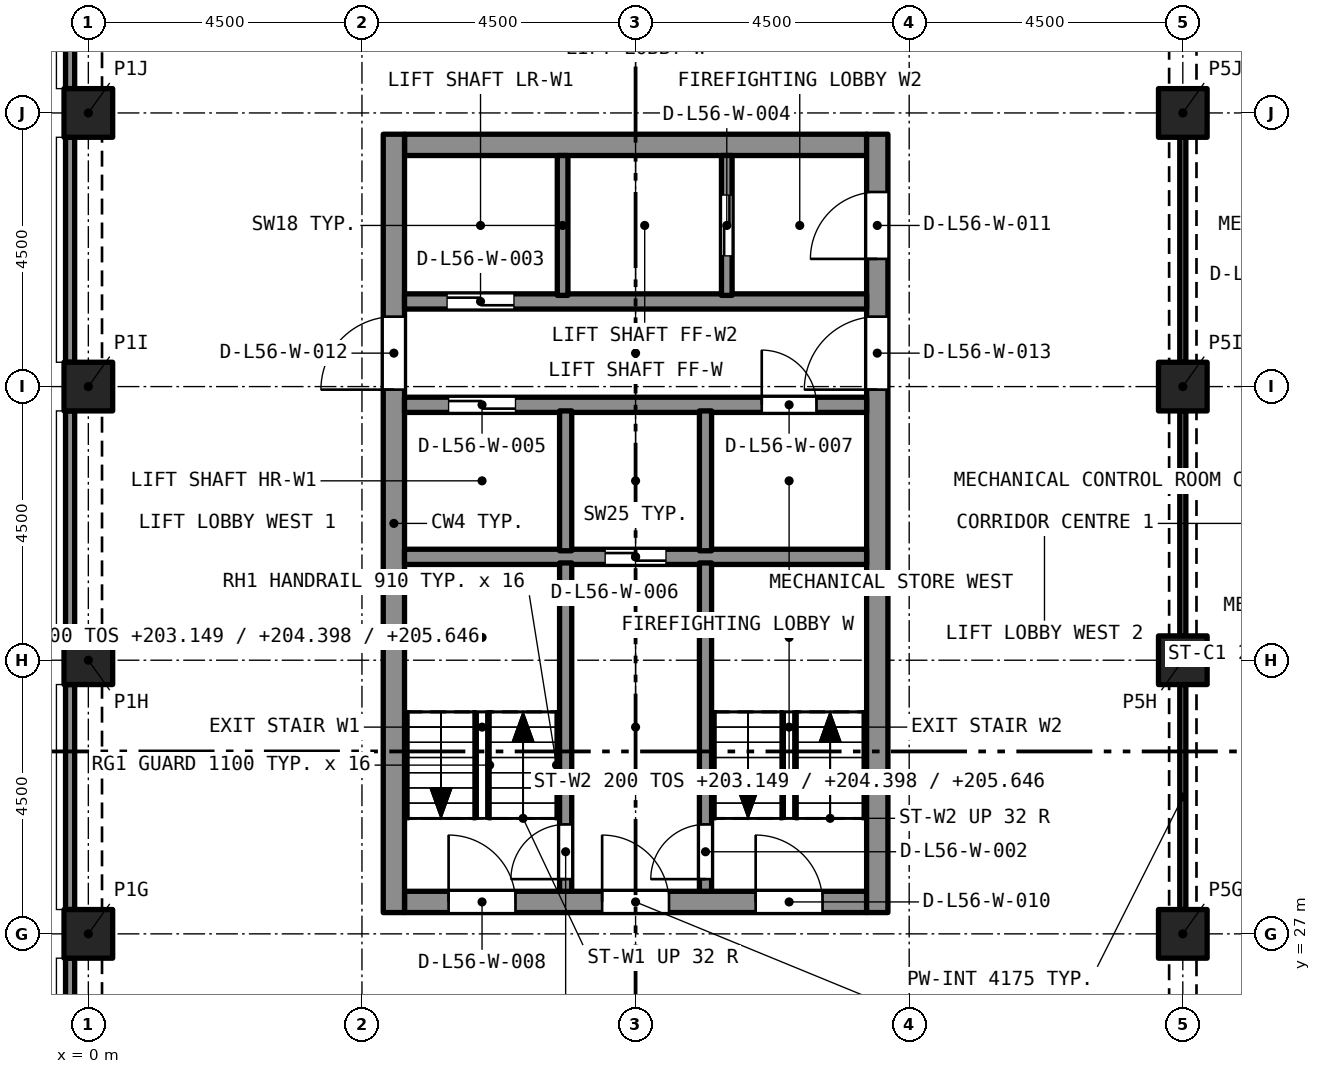
"""IFC4 building model, lengths in metres.
Left out: names, types, materials, properties, quantities, classifications, styles, units other than length and angle.
Written with IfcOpenShell. Run it as: python <this file> out.ifc"""

import sys

from ifc_helpers import new_model, si_unit, direction, frame, frame_2d, origin, origin_2d, place, context, subcontext, project, spatial, rectangle, extrude, element, fill, save


model = new_model("IFC4")
c1 = context("Model", 3, precision=1e-05, world=origin(), true_north=direction((0.0, 1.0)))
c2 = subcontext(c1, "Body", "Model", "MODEL_VIEW")
j1 = project(units=[si_unit("LENGTHUNIT", "METRE"), si_unit("PLANEANGLEUNIT", "RADIAN")], contexts=[c1])
p1 = place(None, origin())
s1 = spatial("IfcSite", under=j1, at=p1, CompositionType="ELEMENT")
p2 = place(p1, origin())
s2 = spatial("IfcBuilding", under=s1, at=p2, CompositionType="ELEMENT")
p3 = place(p2, frame((0.0, 0.0, 201.9)))
s3 = spatial("IfcBuildingStorey", under=s2, at=p3, CompositionType="ELEMENT", Elevation=201.9)
for number, where, z_axis, x_axis in (
    (1, (0.0, 27.0, 0.0), (0.0, 0.0, 1.0), (1.0, 0.0, 0.0)),
    (2, (18.0, 27.0, 0.0), (0.0, 0.0, 1.0), (1.0, 0.0, 0.0)),
    (3, (0.0, 31.5, 0.0), (0.0, 0.0, 1.0), (1.0, 0.0, 0.0)),
    (4, (18.0, 31.5, 0.0), (0.0, 0.0, 1.0), (1.0, 0.0, 0.0)),
    (5, (0.0, 36.0, 0.0), (0.0, 0.0, 1.0), (1.0, 0.0, 0.0)),
    (6, (18.0, 36.0, 0.0), (0.0, 0.0, 1.0), (1.0, 0.0, 0.0)),
    (7, (0.0, 40.5, 0.0), (0.0, 0.0, 1.0), (1.0, 0.0, 0.0)),
    (8, (18.0, 40.5, 0.0), (0.0, 0.0, 1.0), (1.0, 0.0, 0.0)),
):
    element("IfcColumn", number, at=place(p3, frame(where, z_axis=z_axis, x_axis=x_axis)), inside=s3, PredefinedType="COLUMN", context=c2, shape_type="SweptSolid", body=[
        extrude(rectangle(XDim=0.8, YDim=0.8, at=origin_2d()), origin(), (0.0, 0.0, 1.0), 4.995),
    ])
p4 = place(p3, frame((5.2, 27.525, 0.0), z_axis=(0.0, 0.0, 1.0), x_axis=(1.0, 0.0, 0.0)))
e9 = element("IfcWall", 9, at=p4, inside=s3, PredefinedType="SOLIDWALL", context=c2, shape_type="SweptSolid", body=[
    extrude(rectangle(XDim=7.6, YDim=0.35, at=frame_2d((3.8, 0.0))), origin(), (0.0, 0.0, 1.0), 4.995),
])
p5 = place(p4, frame((0.725, 0.0, 0.0)))
e10 = element("IfcOpeningElement", 10, at=p5, cuts=e9, PredefinedType="OPENING", context=c2, shape_type="SweptSolid", body=[
    extrude(rectangle(XDim=1.1, YDim=2.1, at=frame_2d((0.55, 1.05))), frame((0.0, 0.185, 0.0), z_axis=(0.0, -1.0, 0.0), x_axis=(1.0, 0.0, 0.0)), (0.0, 0.0, 1.0), 0.37),
])
p6 = place(p4, frame((3.25, 0.0, 0.0)))
e11 = element("IfcOpeningElement", 11, at=p6, cuts=e9, PredefinedType="OPENING", context=c2, shape_type="SweptSolid", body=[
    extrude(rectangle(XDim=1.1, YDim=2.1, at=frame_2d((0.55, 1.05))), frame((0.0, 0.185, 0.0), z_axis=(0.0, -1.0, 0.0), x_axis=(1.0, 0.0, 0.0)), (0.0, 0.0, 1.0), 0.37),
])
p7 = place(p4, frame((5.775, 0.0, 0.0)))
e12 = element("IfcOpeningElement", 12, at=p7, cuts=e9, PredefinedType="OPENING", context=c2, shape_type="SweptSolid", body=[
    extrude(rectangle(XDim=1.1, YDim=2.1, at=frame_2d((0.55, 1.05))), frame((0.0, 0.185, 0.0), z_axis=(0.0, -1.0, 0.0), x_axis=(1.0, 0.0, 0.0)), (0.0, 0.0, 1.0), 0.37),
])
p8 = place(p3, frame((5.2, 39.975, 0.0), z_axis=(0.0, 0.0, 1.0), x_axis=(1.0, 0.0, 0.0)))
e13 = element("IfcWall", 13, at=p8, inside=s3, PredefinedType="SOLIDWALL", context=c2, shape_type="SweptSolid", body=[
    extrude(rectangle(XDim=7.6, YDim=0.35, at=frame_2d((3.8, 0.0))), origin(), (0.0, 0.0, 1.0), 4.995),
])
p9 = place(p3, frame((5.025, 27.35, 0.0), z_axis=(0.0, 0.0, 1.0), x_axis=(0.0, 1.0, 0.0)))
e14 = element("IfcWall", 14, at=p9, inside=s3, PredefinedType="SOLIDWALL", context=c2, shape_type="SweptSolid", body=[
    extrude(rectangle(XDim=12.8, YDim=0.35, at=frame_2d((6.4, 0.0))), origin(), (0.0, 0.0, 1.0), 4.995),
])
p10 = place(p9, frame((8.6, 0.0, 0.0)))
e15 = element("IfcOpeningElement", 15, at=p10, cuts=e14, PredefinedType="OPENING", context=c2, shape_type="SweptSolid", body=[
    extrude(rectangle(XDim=1.2, YDim=2.1, at=frame_2d((0.6, 1.05))), frame((0.0, 0.185, 0.0), z_axis=(0.0, -1.0, 0.0), x_axis=(1.0, 0.0, 0.0)), (0.0, 0.0, 1.0), 0.37),
])
p11 = place(p3, frame((12.975, 27.35, 0.0), z_axis=(0.0, 0.0, 1.0), x_axis=(0.0, 1.0, 0.0)))
e16 = element("IfcWall", 16, at=p11, inside=s3, PredefinedType="SOLIDWALL", context=c2, shape_type="SweptSolid", body=[
    extrude(rectangle(XDim=12.8, YDim=0.35, at=frame_2d((6.4, 0.0))), origin(), (0.0, 0.0, 1.0), 4.995),
])
p12 = place(p11, frame((10.75, 0.0, 0.0)))
e17 = element("IfcOpeningElement", 17, at=p12, cuts=e16, PredefinedType="OPENING", context=c2, shape_type="SweptSolid", body=[
    extrude(rectangle(XDim=1.1, YDim=2.1, at=frame_2d((0.55, 1.05))), frame((0.0, 0.185, 0.0), z_axis=(0.0, -1.0, 0.0), x_axis=(1.0, 0.0, 0.0)), (0.0, 0.0, 1.0), 0.37),
])
p13 = place(p11, frame((8.6, 0.0, 0.0)))
e18 = element("IfcOpeningElement", 18, at=p13, cuts=e16, PredefinedType="OPENING", context=c2, shape_type="SweptSolid", body=[
    extrude(rectangle(XDim=1.2, YDim=2.1, at=frame_2d((0.6, 1.05))), frame((0.0, 0.185, 0.0), z_axis=(0.0, -1.0, 0.0), x_axis=(1.0, 0.0, 0.0)), (0.0, 0.0, 1.0), 0.37),
])
for number, where, z_axis, x_axis in (
    (19, (-0.3, 40.9, 0.0), (0.0, 0.0, 1.0), (0.0, 1.0, 0.0)),
    (20, (-0.3, 36.4, 0.0), (0.0, 0.0, 1.0), (0.0, 1.0, 0.0)),
    (21, (-0.3, 31.9, 0.0), (0.0, 0.0, 1.0), (0.0, 1.0, 0.0)),
    (22, (-0.3, 27.4, 0.0), (0.0, 0.0, 1.0), (0.0, 1.0, 0.0)),
    (23, (-0.3, 22.9, 0.0), (0.0, 0.0, 1.0), (0.0, 1.0, 0.0)),
):
    element("IfcWall", number, at=place(p3, frame(where, z_axis=z_axis, x_axis=x_axis)), inside=s3, PredefinedType="SOLIDWALL", context=c2, shape_type="SweptSolid", body=[
        extrude(rectangle(XDim=3.7, YDim=0.15, at=frame_2d((1.85, 0.0))), origin(), (0.0, 0.0, 1.0), 4.995),
    ])
p14 = place(p3, frame((5.2, 33.2, 0.0), z_axis=(0.0, 0.0, 1.0), x_axis=(1.0, 0.0, 0.0)))
e24 = element("IfcWall", 24, at=p14, inside=s3, PredefinedType="SOLIDWALL", context=c2, shape_type="SweptSolid", body=[
    extrude(rectangle(XDim=7.6, YDim=0.25, at=frame_2d((3.8, 0.0))), origin(), (0.0, 0.0, 1.0), 4.695),
])
p15 = place(p14, frame((3.3, 0.0, 0.0)))
e25 = element("IfcOpeningElement", 25, at=p15, cuts=e24, PredefinedType="OPENING", context=c2, shape_type="SweptSolid", body=[
    extrude(rectangle(XDim=1.0, YDim=2.1, at=frame_2d((0.5, 1.05))), frame((0.0, 0.135, 0.0), z_axis=(0.0, -1.0, 0.0), x_axis=(1.0, 0.0, 0.0)), (0.0, 0.0, 1.0), 0.27),
])
p16 = place(p3, frame((5.2, 35.7, 0.0), z_axis=(0.0, 0.0, 1.0), x_axis=(1.0, 0.0, 0.0)))
e26 = element("IfcWall", 26, at=p16, inside=s3, PredefinedType="SOLIDWALL", context=c2, shape_type="SweptSolid", body=[
    extrude(rectangle(XDim=7.6, YDim=0.25, at=frame_2d((3.8, 0.0))), origin(), (0.0, 0.0, 1.0), 4.695),
])
p17 = place(p16, frame((0.725, 0.0, 0.0)))
e27 = element("IfcOpeningElement", 27, at=p17, cuts=e26, PredefinedType="OPENING", context=c2, shape_type="SweptSolid", body=[
    extrude(rectangle(XDim=1.1, YDim=2.4, at=frame_2d((0.55, 1.2))), frame((0.0, 0.135, 0.0), z_axis=(0.0, -1.0, 0.0), x_axis=(1.0, 0.0, 0.0)), (0.0, 0.0, 1.0), 0.27),
])
p18 = place(p16, frame((5.875, 0.0, 0.0)))
e28 = element("IfcOpeningElement", 28, at=p18, cuts=e26, PredefinedType="OPENING", context=c2, shape_type="SweptSolid", body=[
    extrude(rectangle(XDim=0.9, YDim=2.1, at=frame_2d((0.45, 1.05))), frame((0.0, 0.135, 0.0), z_axis=(0.0, -1.0, 0.0), x_axis=(1.0, 0.0, 0.0)), (0.0, 0.0, 1.0), 0.27),
])
p19 = place(p3, frame((5.2, 37.4, 0.0), z_axis=(0.0, 0.0, 1.0), x_axis=(1.0, 0.0, 0.0)))
e29 = element("IfcWall", 29, at=p19, inside=s3, PredefinedType="SOLIDWALL", context=c2, shape_type="SweptSolid", body=[
    extrude(rectangle(XDim=7.6, YDim=0.25, at=frame_2d((3.8, 0.0))), origin(), (0.0, 0.0, 1.0), 4.695),
])
p20 = place(p19, frame((0.7, 0.0, 0.0)))
e30 = element("IfcOpeningElement", 30, at=p20, cuts=e29, PredefinedType="OPENING", context=c2, shape_type="SweptSolid", body=[
    extrude(rectangle(XDim=1.1, YDim=2.4, at=frame_2d((0.55, 1.2))), frame((0.0, 0.135, 0.0), z_axis=(0.0, -1.0, 0.0), x_axis=(1.0, 0.0, 0.0)), (0.0, 0.0, 1.0), 0.27),
])
p21 = place(p3, frame((7.85, 27.7, 0.0), z_axis=(0.0, 0.0, 1.0), x_axis=(0.0, 1.0, 0.0)))
e31 = element("IfcWall", 31, at=p21, inside=s3, PredefinedType="SOLIDWALL", context=c2, shape_type="SweptSolid", body=[
    extrude(rectangle(XDim=5.4, YDim=0.2, at=frame_2d((2.7, 0.0))), origin(), (0.0, 0.0, 1.0), 4.695),
])
p22 = place(p21, frame((0.2, 0.0, 0.0)))
e32 = element("IfcOpeningElement", 32, at=p22, cuts=e31, PredefinedType="OPENING", context=c2, shape_type="SweptSolid", body=[
    extrude(rectangle(XDim=0.9, YDim=2.1, at=frame_2d((0.45, 1.05))), frame((0.0, 0.11, 0.0), z_axis=(0.0, -1.0, 0.0), x_axis=(1.0, 0.0, 0.0)), (0.0, 0.0, 1.0), 0.22),
])
p23 = place(p3, frame((10.15, 27.7, 0.0), z_axis=(0.0, 0.0, 1.0), x_axis=(0.0, 1.0, 0.0)))
e33 = element("IfcWall", 33, at=p23, inside=s3, PredefinedType="SOLIDWALL", context=c2, shape_type="SweptSolid", body=[
    extrude(rectangle(XDim=5.4, YDim=0.2, at=frame_2d((2.7, 0.0))), origin(), (0.0, 0.0, 1.0), 4.695),
])
p24 = place(p23, frame((0.2, 0.0, 0.0)))
e34 = element("IfcOpeningElement", 34, at=p24, cuts=e33, PredefinedType="OPENING", context=c2, shape_type="SweptSolid", body=[
    extrude(rectangle(XDim=0.9, YDim=2.1, at=frame_2d((0.45, 1.05))), frame((0.0, 0.11, 0.0), z_axis=(0.0, -1.0, 0.0), x_axis=(1.0, 0.0, 0.0)), (0.0, 0.0, 1.0), 0.22),
])
for number, where, z_axis, x_axis in (
    (35, (7.85, 33.3, 0.0), (0.0, 0.0, 1.0), (0.0, 1.0, 0.0)),
    (36, (10.15, 33.3, 0.0), (0.0, 0.0, 1.0), (0.0, 1.0, 0.0)),
):
    element("IfcWall", number, at=place(p3, frame(where, z_axis=z_axis, x_axis=x_axis)), inside=s3, PredefinedType="SOLIDWALL", context=c2, shape_type="SweptSolid", body=[
        extrude(rectangle(XDim=2.3, YDim=0.2, at=frame_2d((1.15, 0.0))), origin(), (0.0, 0.0, 1.0), 4.695),
    ])
p25 = place(p3, frame((7.8, 37.5, 0.0), z_axis=(0.0, 0.0, 1.0), x_axis=(0.0, 1.0, 0.0)))
e37 = element("IfcWall", 37, at=p25, inside=s3, PredefinedType="SOLIDWALL", context=c2, shape_type="SweptSolid", body=[
    extrude(rectangle(XDim=2.3, YDim=0.175, at=frame_2d((1.15, 0.0))), origin(), (0.0, 0.0, 1.0), 4.695),
])
p26 = place(p3, frame((10.5, 37.5, 0.0), z_axis=(0.0, 0.0, 1.0), x_axis=(0.0, 1.0, 0.0)))
e38 = element("IfcWall", 38, at=p26, inside=s3, PredefinedType="SOLIDWALL", context=c2, shape_type="SweptSolid", body=[
    extrude(rectangle(XDim=2.3, YDim=0.175, at=frame_2d((1.15, 0.0))), origin(), (0.0, 0.0, 1.0), 4.695),
])
p27 = place(p26, frame((0.65, 0.0, 0.0)))
e39 = element("IfcOpeningElement", 39, at=p27, cuts=e38, PredefinedType="OPENING", context=c2, shape_type="SweptSolid", body=[
    extrude(rectangle(XDim=1.0, YDim=2.1, at=frame_2d((0.5, 1.05))), frame((0.0, 0.097, 0.0), z_axis=(0.0, -1.0, 0.0), x_axis=(1.0, 0.0, 0.0)), (0.0, 0.0, 1.0), 0.195),
])
for number, where, z_axis, x_axis in (
    (40, (18.0, 27.4, 0.0), (0.0, 0.0, 1.0), (0.0, 1.0, 0.0)),
    (41, (18.0, 31.9, 0.0), (0.0, 0.0, 1.0), (0.0, 1.0, 0.0)),
    (42, (18.0, 36.4, 0.0), (0.0, 0.0, 1.0), (0.0, 1.0, 0.0)),
):
    element("IfcWall", number, at=place(p3, frame(where, z_axis=z_axis, x_axis=x_axis)), inside=s3, PredefinedType="PARTITIONING", context=c2, shape_type="SweptSolid", body=[
        extrude(rectangle(XDim=3.7, YDim=0.1, at=frame_2d((1.85, 0.0))), origin(), (0.0, 0.0, 1.0), 4.175),
    ])
p28 = place(p22, origin())
e43 = element("IfcDoor", 43, at=p28, inside=s3, OperationType="SINGLE_SWING_LEFT", PredefinedType="DOOR", context=c2, shape_type="SweptSolid", body=[
    extrude(rectangle(XDim=0.9, YDim=2.1, at=frame_2d((0.45, 1.05))), frame((0.0, 0.025, 0.0), z_axis=(0.0, -1.0, 0.0), x_axis=(1.0, 0.0, 0.0)), (0.0, 0.0, 1.0), 0.05),
])
fill(e32, e43)
p29 = place(p24, origin())
e44 = element("IfcDoor", 44, at=p29, inside=s3, OperationType="SINGLE_SWING_LEFT", PredefinedType="DOOR", context=c2, shape_type="SweptSolid", body=[
    extrude(rectangle(XDim=0.9, YDim=2.1, at=frame_2d((0.45, 1.05))), frame((0.0, 0.025, 0.0), z_axis=(0.0, -1.0, 0.0), x_axis=(1.0, 0.0, 0.0)), (0.0, 0.0, 1.0), 0.05),
])
fill(e34, e44)
p30 = place(p20, origin())
e45 = element("IfcDoor", 45, at=p30, inside=s3, OperationType="SLIDING_TO_LEFT", PredefinedType="DOOR", context=c2, shape_type="SweptSolid", body=[
    extrude(rectangle(XDim=1.1, YDim=2.4, at=frame_2d((0.55, 1.2))), frame((0.0, 0.025, 0.0), z_axis=(0.0, -1.0, 0.0), x_axis=(1.0, 0.0, 0.0)), (0.0, 0.0, 1.0), 0.05),
])
fill(e30, e45)
p31 = place(p27, origin())
e46 = element("IfcDoor", 46, at=p31, inside=s3, OperationType="SLIDING_TO_LEFT", PredefinedType="DOOR", context=c2, shape_type="SweptSolid", body=[
    extrude(rectangle(XDim=1.0, YDim=2.1, at=frame_2d((0.5, 1.05))), frame((0.0, 0.025, 0.0), z_axis=(0.0, -1.0, 0.0), x_axis=(1.0, 0.0, 0.0)), (0.0, 0.0, 1.0), 0.05),
])
fill(e39, e46)
p32 = place(p17, origin())
e47 = element("IfcDoor", 47, at=p32, inside=s3, OperationType="SLIDING_TO_LEFT", PredefinedType="DOOR", context=c2, shape_type="SweptSolid", body=[
    extrude(rectangle(XDim=1.1, YDim=2.4, at=frame_2d((0.55, 1.2))), frame((0.0, 0.025, 0.0), z_axis=(0.0, -1.0, 0.0), x_axis=(1.0, 0.0, 0.0)), (0.0, 0.0, 1.0), 0.05),
])
fill(e27, e47)
p33 = place(p15, origin())
e48 = element("IfcDoor", 48, at=p33, inside=s3, OperationType="SLIDING_TO_LEFT", PredefinedType="DOOR", context=c2, shape_type="SweptSolid", body=[
    extrude(rectangle(XDim=1.0, YDim=2.1, at=frame_2d((0.5, 1.05))), frame((0.0, 0.025, 0.0), z_axis=(0.0, -1.0, 0.0), x_axis=(1.0, 0.0, 0.0)), (0.0, 0.0, 1.0), 0.05),
])
fill(e25, e48)
p34 = place(p18, origin())
e49 = element("IfcDoor", 49, at=p34, inside=s3, OperationType="SINGLE_SWING_LEFT", PredefinedType="DOOR", context=c2, shape_type="SweptSolid", body=[
    extrude(rectangle(XDim=0.9, YDim=2.1, at=frame_2d((0.45, 1.05))), frame((0.0, 0.025, 0.0), z_axis=(0.0, -1.0, 0.0), x_axis=(1.0, 0.0, 0.0)), (0.0, 0.0, 1.0), 0.05),
])
fill(e28, e49)
p35 = place(p5, origin())
e50 = element("IfcDoor", 50, at=p35, inside=s3, OperationType="SINGLE_SWING_LEFT", PredefinedType="DOOR", context=c2, shape_type="SweptSolid", body=[
    extrude(rectangle(XDim=1.1, YDim=2.1, at=frame_2d((0.55, 1.05))), frame((0.0, 0.025, 0.0), z_axis=(0.0, -1.0, 0.0), x_axis=(1.0, 0.0, 0.0)), (0.0, 0.0, 1.0), 0.05),
])
fill(e10, e50)
p36 = place(p6, origin())
e51 = element("IfcDoor", 51, at=p36, inside=s3, OperationType="SINGLE_SWING_LEFT", PredefinedType="DOOR", context=c2, shape_type="SweptSolid", body=[
    extrude(rectangle(XDim=1.1, YDim=2.1, at=frame_2d((0.55, 1.05))), frame((0.0, 0.025, 0.0), z_axis=(0.0, -1.0, 0.0), x_axis=(1.0, 0.0, 0.0)), (0.0, 0.0, 1.0), 0.05),
])
fill(e11, e51)
p37 = place(p7, origin())
e52 = element("IfcDoor", 52, at=p37, inside=s3, OperationType="SINGLE_SWING_LEFT", PredefinedType="DOOR", context=c2, shape_type="SweptSolid", body=[
    extrude(rectangle(XDim=1.1, YDim=2.1, at=frame_2d((0.55, 1.05))), frame((0.0, 0.025, 0.0), z_axis=(0.0, -1.0, 0.0), x_axis=(1.0, 0.0, 0.0)), (0.0, 0.0, 1.0), 0.05),
])
fill(e12, e52)
p38 = place(p12, origin())
e53 = element("IfcDoor", 53, at=p38, inside=s3, OperationType="SINGLE_SWING_LEFT", PredefinedType="DOOR", context=c2, shape_type="SweptSolid", body=[
    extrude(rectangle(XDim=1.1, YDim=2.1, at=frame_2d((0.55, 1.05))), frame((0.0, 0.025, 0.0), z_axis=(0.0, -1.0, 0.0), x_axis=(1.0, 0.0, 0.0)), (0.0, 0.0, 1.0), 0.05),
])
fill(e17, e53)
p39 = place(p10, origin())
e54 = element("IfcDoor", 54, at=p39, inside=s3, OperationType="SINGLE_SWING_LEFT", PredefinedType="DOOR", context=c2, shape_type="SweptSolid", body=[
    extrude(rectangle(XDim=1.2, YDim=2.1, at=frame_2d((0.6, 1.05))), frame((0.0, 0.025, 0.0), z_axis=(0.0, -1.0, 0.0), x_axis=(1.0, 0.0, 0.0)), (0.0, 0.0, 1.0), 0.05),
])
fill(e15, e54)
p40 = place(p13, origin())
e55 = element("IfcDoor", 55, at=p40, inside=s3, OperationType="SINGLE_SWING_LEFT", PredefinedType="DOOR", context=c2, shape_type="SweptSolid", body=[
    extrude(rectangle(XDim=1.2, YDim=2.1, at=frame_2d((0.6, 1.05))), frame((0.0, 0.025, 0.0), z_axis=(0.0, -1.0, 0.0), x_axis=(1.0, 0.0, 0.0)), (0.0, 0.0, 1.0), 0.05),
])
fill(e18, e55)
save(model, sys.argv[1])
